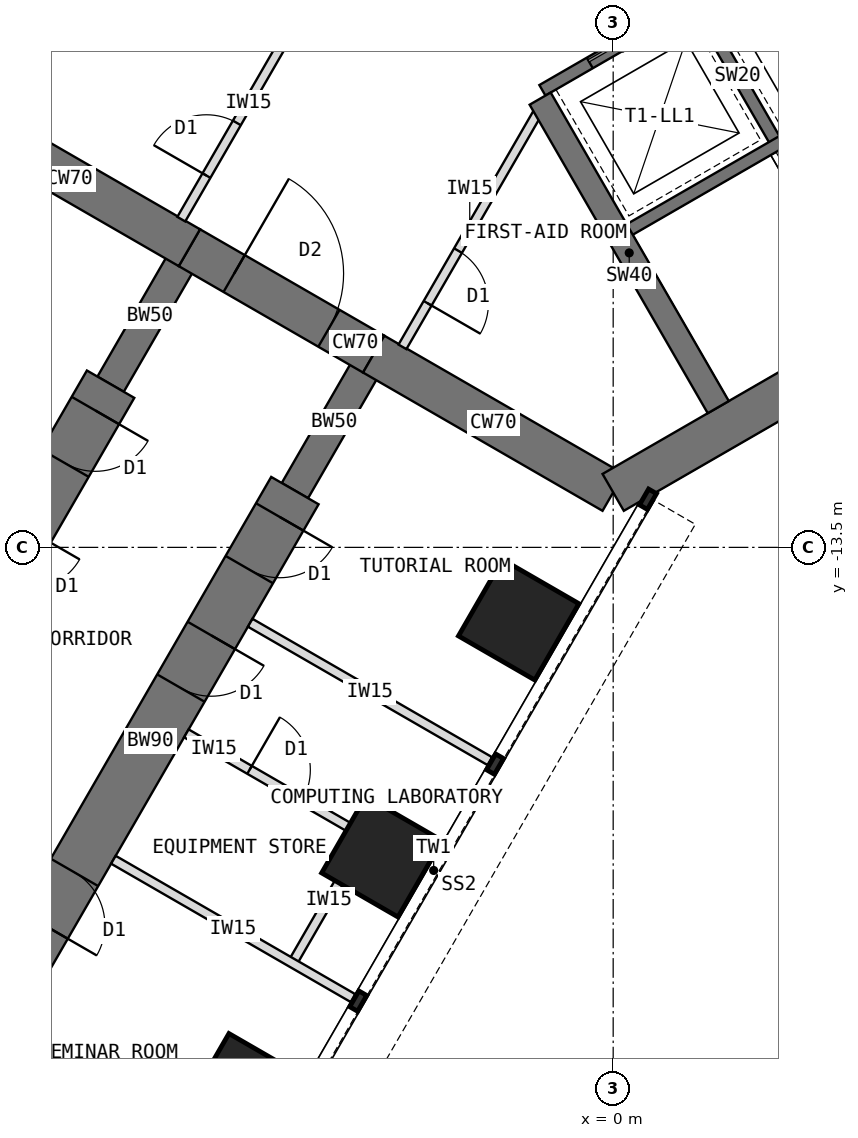
"""IFC4 building model, lengths in metres.
Left out: names, types, materials, properties, quantities, classifications, styles, units other than length and angle.
Written with IfcOpenShell. Run it as: python <this file> out.ifc"""

import sys

from ifc_helpers import new_model, si_unit, direction, frame, frame_2d, origin, origin_2d, place, context, subcontext, project, spatial, rectangle, extrude, element, fill, save


model = new_model("IFC4")
c1 = context("Model", 3, precision=1e-05, world=origin(), true_north=direction((0.0, 1.0)))
c2 = subcontext(c1, "Body", "Model", "MODEL_VIEW")
j1 = project(units=[si_unit("LENGTHUNIT", "METRE"), si_unit("PLANEANGLEUNIT", "RADIAN")], contexts=[c1])
p1 = place(None, origin())
s1 = spatial("IfcSite", under=j1, at=p1, CompositionType="ELEMENT")
p2 = place(p1, origin())
s2 = spatial("IfcBuilding", under=s1, at=p2, CompositionType="ELEMENT")
p3 = place(p2, frame((0.0, 0.0, 60.5)))
s3 = spatial("IfcBuildingStorey", under=s2, at=p3, CompositionType="ELEMENT", Elevation=60.5)
p4 = place(p3, frame((-10.908, -6.298, 0.0), z_axis=(0.0, 0.0, 1.0), x_axis=(0.866034513004, -0.499984222037, 0.0)))
e1 = element("IfcWall", 1, at=p4, inside=s3, PredefinedType="SHEAR", context=c2, shape_type="SweptSolid", body=[
    extrude(rectangle(XDim=4.548, YDim=0.7, at=frame_2d((2.274, 0.0))), origin(), (0.0, 0.0, 1.0), 4.0),
])
p5 = place(p3, frame((-6.97, -8.572, 0.0), z_axis=(0.0, 0.0, 1.0), x_axis=(0.866019471182, -0.500010275428, 0.0)))
e2 = element("IfcWall", 2, at=p5, inside=s3, PredefinedType="SHEAR", context=c2, shape_type="SweptSolid", body=[
    extrude(rectangle(XDim=3.5, YDim=0.7, at=frame_2d((1.75, 0.0))), origin(), (0.0, 0.0, 1.0), 4.0),
])
p6 = place(p5, frame((0.85, 0.0, 0.0)))
e3 = element("IfcOpeningElement", 3, at=p6, cuts=e2, PredefinedType="OPENING", context=c2, shape_type="SweptSolid", body=[
    extrude(rectangle(XDim=1.8, YDim=2.1, at=frame_2d((0.9, 1.05))), frame((0.0, 0.36, 0.0), z_axis=(0.0, -1.0, 0.0), x_axis=(1.0, 0.0, 0.0)), (0.0, 0.0, 1.0), 0.72),
])
p7 = place(p3, frame((-3.939, -10.322, 0.0), z_axis=(0.0, 0.0, 1.0), x_axis=(0.866011268655, -0.500024481964, 0.0)))
e4 = element("IfcWall", 4, at=p7, inside=s3, PredefinedType="SHEAR", context=c2, shape_type="SweptSolid", body=[
    extrude(rectangle(XDim=4.548, YDim=0.7, at=frame_2d((2.274, 0.0))), origin(), (0.0, 0.0, 1.0), 4.0),
])
p8 = place(p3, frame((0.0, -12.596, 0.0), z_axis=(0.0, 0.0, 1.0), x_axis=(0.866021940709, 0.500005998175, 0.0)))
e5 = element("IfcWall", 5, at=p8, inside=s3, PredefinedType="SHEAR", context=c2, shape_type="SweptSolid", body=[
    extrude(rectangle(XDim=12.596, YDim=0.7, at=frame_2d((6.298, 0.0))), origin(), (0.0, 0.0, 1.0), 4.0),
])
p9 = place(p3, frame((-3.939, -10.322, 0.0), z_axis=(0.0, 0.0, 1.0), x_axis=(-0.499918158782, -0.866072649678, 0.0)))
e6 = element("IfcWall", 6, at=p9, inside=s3, PredefinedType="SHEAR", context=c2, shape_type="SweptSolid", body=[
    extrude(rectangle(XDim=2.592, YDim=0.5, at=frame_2d((1.296, 0.0))), origin(), (0.0, 0.0, 1.0), 4.0),
])
p10 = place(p3, frame((-5.234, -12.566, 0.0), z_axis=(0.0, 0.0, 1.0), x_axis=(-0.499997557548, -0.86602681393, 0.0)))
e7 = element("IfcWall", 7, at=p10, inside=s3, PredefinedType="SHEAR", context=c2, shape_type="SweptSolid", body=[
    extrude(rectangle(XDim=9.5, YDim=0.9, at=frame_2d((4.75, 0.0))), origin(), (0.0, 0.0, 1.0), 4.0),
])
p11 = place(p10, frame((0.5, 0.0, 0.0)))
e8 = element("IfcOpeningElement", 8, at=p11, cuts=e7, PredefinedType="OPENING", context=c2, shape_type="SweptSolid", body=[
    extrude(rectangle(XDim=1.0, YDim=2.1, at=frame_2d((0.5, 1.05))), frame((0.0, 0.46, 0.0), z_axis=(0.0, -1.0, 0.0), x_axis=(1.0, 0.0, 0.0)), (0.0, 0.0, 1.0), 0.92),
])
p12 = place(p10, frame((2.75, 0.0, 0.0)))
e9 = element("IfcOpeningElement", 9, at=p12, cuts=e7, PredefinedType="OPENING", context=c2, shape_type="SweptSolid", body=[
    extrude(rectangle(XDim=1.0, YDim=2.1, at=frame_2d((0.5, 1.05))), frame((0.0, 0.46, 0.0), z_axis=(0.0, -1.0, 0.0), x_axis=(1.0, 0.0, 0.0)), (0.0, 0.0, 1.0), 0.92),
])
p13 = place(p10, frame((7.25, 0.0, 0.0)))
e10 = element("IfcOpeningElement", 10, at=p13, cuts=e7, PredefinedType="OPENING", context=c2, shape_type="SweptSolid", body=[
    extrude(rectangle(XDim=1.0, YDim=2.1, at=frame_2d((0.5, 1.05))), frame((0.0, 0.46, 0.0), z_axis=(0.0, -1.0, 0.0), x_axis=(1.0, 0.0, 0.0)), (0.0, 0.0, 1.0), 0.92),
])
p14 = place(p3, frame((-6.97, -8.572, 0.0), z_axis=(0.0, 0.0, 1.0), x_axis=(-0.499988811324, -0.866031863473, 0.0)))
e11 = element("IfcWall", 11, at=p14, inside=s3, PredefinedType="SHEAR", context=c2, shape_type="SweptSolid", body=[
    extrude(rectangle(XDim=2.592, YDim=0.5, at=frame_2d((1.296, 0.0))), origin(), (0.0, 0.0, 1.0), 4.0),
])
p15 = place(p3, frame((-8.266, -10.816, 0.0), z_axis=(0.0, 0.0, 1.0), x_axis=(-0.499997557548, -0.86602681393, 0.0)))
e12 = element("IfcWall", 12, at=p15, inside=s3, PredefinedType="SHEAR", context=c2, shape_type="SweptSolid", body=[
    extrude(rectangle(XDim=9.5, YDim=0.9, at=frame_2d((4.75, 0.0))), origin(), (0.0, 0.0, 1.0), 4.0),
])
p16 = place(p15, frame((0.5, 0.0, 0.0)))
e13 = element("IfcOpeningElement", 13, at=p16, cuts=e12, PredefinedType="OPENING", context=c2, shape_type="SweptSolid", body=[
    extrude(rectangle(XDim=1.0, YDim=2.1, at=frame_2d((0.5, 1.05))), frame((0.0, 0.46, 0.0), z_axis=(0.0, -1.0, 0.0), x_axis=(1.0, 0.0, 0.0)), (0.0, 0.0, 1.0), 0.92),
])
p17 = place(p15, frame((2.75, 0.0, 0.0)))
e14 = element("IfcOpeningElement", 14, at=p17, cuts=e12, PredefinedType="OPENING", context=c2, shape_type="SweptSolid", body=[
    extrude(rectangle(XDim=1.0, YDim=2.1, at=frame_2d((0.5, 1.05))), frame((0.0, 0.46, 0.0), z_axis=(0.0, -1.0, 0.0), x_axis=(1.0, 0.0, 0.0)), (0.0, 0.0, 1.0), 0.92),
])
p18 = place(p15, frame((7.25, 0.0, 0.0)))
e15 = element("IfcOpeningElement", 15, at=p18, cuts=e12, PredefinedType="OPENING", context=c2, shape_type="SweptSolid", body=[
    extrude(rectangle(XDim=1.0, YDim=2.1, at=frame_2d((0.5, 1.05))), frame((0.0, 0.46, 0.0), z_axis=(0.0, -1.0, 0.0), x_axis=(1.0, 0.0, 0.0)), (0.0, 0.0, 1.0), 0.92),
])
for number, where, z_axis, x_axis in (
    (16, (-1.554, -14.691, 0.0), (0.0, 0.0, 1.0), (0.5, 0.866, 0.0)),
    (17, (-3.804, -18.588, 0.0), (0.0, 0.0, 1.0), (0.5, 0.866, 0.0)),
    (18, (-6.054, -22.486, 0.0), (0.0, 0.0, 1.0), (0.5, 0.866, 0.0)),
):
    element("IfcColumn", number, at=place(p3, frame(where, z_axis=z_axis, x_axis=x_axis)), inside=s3, PredefinedType="COLUMN", context=c2, shape_type="SweptSolid", body=[
        extrude(rectangle(XDim=1.45, YDim=1.45, at=origin_2d()), origin(), (0.0, 0.0, 1.0), 4.0),
    ])
p19 = place(p3, frame((-1.164, -5.984, 0.0), z_axis=(0.0, 0.0, 1.0), x_axis=(0.866026010844, 0.49999894854, 0.0)))
e19 = element("IfcWall", 19, at=p19, inside=s3, PredefinedType="SHEAR", context=c2, shape_type="SweptSolid", body=[
    extrude(rectangle(XDim=8.0, YDim=0.2, at=frame_2d((4.0, 0.0))), origin(), (0.0, 0.0, 1.0), 4.0),
])
p20 = place(p19, frame((6.3, 0.0, 0.0)))
e20 = element("IfcOpeningElement", 20, at=p20, cuts=e19, PredefinedType="OPENING", context=c2, shape_type="SweptSolid", body=[
    extrude(rectangle(XDim=1.2, YDim=2.1, at=frame_2d((0.6, 1.05))), frame((0.0, 0.11, 0.0), z_axis=(0.0, -1.0, 0.0), x_axis=(1.0, 0.0, 0.0)), (0.0, 0.0, 1.0), 0.22),
])
p21 = place(p19, frame((0.9, 0.0, 0.0)))
e21 = element("IfcOpeningElement", 21, at=p21, cuts=e19, PredefinedType="OPENING", context=c2, shape_type="SweptSolid", body=[
    extrude(rectangle(XDim=1.1, YDim=2.2, at=frame_2d((0.55, 1.1))), frame((0.0, 0.11, 0.0), z_axis=(0.0, -1.0, 0.0), x_axis=(1.0, 0.0, 0.0)), (0.0, 0.0, 1.0), 0.22),
])
p22 = place(p19, frame((3.8, 0.0, 0.0)))
e22 = element("IfcOpeningElement", 22, at=p22, cuts=e19, PredefinedType="OPENING", context=c2, shape_type="SweptSolid", body=[
    extrude(rectangle(XDim=1.1, YDim=2.2, at=frame_2d((0.55, 1.1))), frame((0.0, 0.11, 0.0), z_axis=(0.0, -1.0, 0.0), x_axis=(1.0, 0.0, 0.0)), (0.0, 0.0, 1.0), 0.22),
])
p23 = place(p3, frame((1.397, -4.62, 0.0), z_axis=(0.0, 0.0, 1.0), x_axis=(0.499936506574, -0.866062058628, 0.0)))
e23 = element("IfcWall", 23, at=p23, inside=s3, PredefinedType="SHEAR", context=c2, shape_type="SweptSolid", body=[
    extrude(rectangle(XDim=2.6, YDim=0.2, at=frame_2d((1.3, 0.0))), origin(), (0.0, 0.0, 1.0), 4.0),
])
p24 = place(p3, frame((0.186, -8.322, 0.0), z_axis=(0.0, 0.0, 1.0), x_axis=(0.866026010844, 0.49999894854, 0.0)))
e24 = element("IfcWall", 24, at=p24, inside=s3, PredefinedType="SHEAR", context=c2, shape_type="SweptSolid", body=[
    extrude(rectangle(XDim=8.0, YDim=0.2, at=frame_2d((4.0, 0.0))), origin(), (0.0, 0.0, 1.0), 4.0),
])
p25 = place(p24, frame((6.7, 0.0, 0.0)))
e25 = element("IfcOpeningElement", 25, at=p25, cuts=e24, PredefinedType="OPENING", context=c2, shape_type="SweptSolid", body=[
    extrude(rectangle(XDim=1.1, YDim=2.1, at=frame_2d((0.55, 1.05))), frame((0.0, 0.11, 0.0), z_axis=(0.0, -1.0, 0.0), x_axis=(1.0, 0.0, 0.0)), (0.0, 0.0, 1.0), 0.22),
])
p26 = place(p3, frame((-1.201, -6.12, 0.0), z_axis=(0.0, 0.0, 1.0), x_axis=(0.500002627198, -0.866023886965, 0.0)))
e26 = element("IfcWall", 26, at=p26, inside=s3, PredefinedType="SHEAR", context=c2, shape_type="SweptSolid", body=[
    extrude(rectangle(XDim=5.858, YDim=0.4, at=frame_2d((2.929, 0.0))), origin(), (0.0, 0.0, 1.0), 4.0),
])
for number, where, z_axis, x_axis in (
    (27, (-5.97, -14.74, 0.0), (0.0, 0.0, 1.0), (0.866, -0.5, 0.0)),
    (28, (-8.22, -18.637, 0.0), (0.0, 0.0, 1.0), (0.866, -0.5, 0.0)),
):
    element("IfcWall", number, at=place(p3, frame(where, z_axis=z_axis, x_axis=x_axis)), inside=s3, PredefinedType="PARTITIONING", context=c2, shape_type="SweptSolid", body=[
        extrude(rectangle(XDim=4.55, YDim=0.15, at=frame_2d((2.275, 0.0))), origin(), (0.0, 0.0, 1.0), 3.8),
    ])
p27 = place(p3, frame((-4.075, -18.259, 0.0), z_axis=(0.0, 0.0, 1.0), x_axis=(-0.500001309137, -0.866024647952, 0.0)))
e29 = element("IfcWall", 29, at=p27, inside=s3, PredefinedType="PARTITIONING", context=c2, shape_type="SweptSolid", body=[
    extrude(rectangle(XDim=2.4, YDim=0.15, at=frame_2d((1.2, 0.0))), origin(), (0.0, 0.0, 1.0), 3.8),
])
p28 = place(p3, frame((-7.02, -16.559, 0.0), z_axis=(0.0, 0.0, 1.0), x_axis=(0.866038511948, -0.499977295307, 0.0)))
e30 = element("IfcWall", 30, at=p28, inside=s3, PredefinedType="PARTITIONING", context=c2, shape_type="SweptSolid", body=[
    extrude(rectangle(XDim=3.4, YDim=0.15, at=frame_2d((1.7, 0.0))), origin(), (0.0, 0.0, 1.0), 3.8),
])
p29 = place(p28, frame((1.2, 0.0, 0.0)))
e31 = element("IfcOpeningElement", 31, at=p29, cuts=e30, PredefinedType="OPENING", context=c2, shape_type="SweptSolid", body=[
    extrude(rectangle(XDim=1.0, YDim=2.1, at=frame_2d((0.5, 1.05))), frame((0.0, 0.085, 0.0), z_axis=(0.0, -1.0, 0.0), x_axis=(1.0, 0.0, 0.0)), (0.0, 0.0, 1.0), 0.17),
])
p30 = place(p3, frame((-1.253, -6.37, 0.0), z_axis=(0.0, 0.0, 1.0), x_axis=(-0.500007369519, -0.866021148949, 0.0)))
e32 = element("IfcWall", 32, at=p30, inside=s3, PredefinedType="PARTITIONING", context=c2, shape_type="SweptSolid", body=[
    extrude(rectangle(XDim=4.426, YDim=0.15, at=frame_2d((2.213, 0.0))), origin(), (0.0, 0.0, 1.0), 3.8),
])
p31 = place(p30, frame((2.598, 0.0, 0.0)))
e33 = element("IfcOpeningElement", 33, at=p31, cuts=e32, PredefinedType="OPENING", context=c2, shape_type="SweptSolid", body=[
    extrude(rectangle(XDim=1.0, YDim=2.1, at=frame_2d((0.5, 1.05))), frame((0.0, 0.085, 0.0), z_axis=(0.0, -1.0, 0.0), x_axis=(1.0, 0.0, 0.0)), (0.0, 0.0, 1.0), 0.17),
])
p32 = place(p3, frame((-7.103, -8.103, 0.0), z_axis=(0.0, 0.0, 1.0), x_axis=(0.500007369519, 0.866021148949, 0.0)))
e34 = element("IfcWall", 34, at=p32, inside=s3, PredefinedType="PARTITIONING", context=c2, shape_type="SweptSolid", body=[
    extrude(rectangle(XDim=4.426, YDim=0.15, at=frame_2d((2.213, 0.0))), origin(), (0.0, 0.0, 1.0), 3.8),
])
p33 = place(p32, frame((0.828, 0.0, 0.0)))
e35 = element("IfcOpeningElement", 35, at=p33, cuts=e34, PredefinedType="OPENING", context=c2, shape_type="SweptSolid", body=[
    extrude(rectangle(XDim=1.0, YDim=2.1, at=frame_2d((0.5, 1.05))), frame((0.0, 0.085, 0.0), z_axis=(0.0, -1.0, 0.0), x_axis=(1.0, 0.0, 0.0)), (0.0, 0.0, 1.0), 0.17),
])
p34 = place(p21, origin())
e36 = element("IfcDoor", 36, at=p34, inside=s3, OperationType="DOUBLE_DOOR_SLIDING", PredefinedType="DOOR", context=c2, shape_type="SweptSolid", body=[
    extrude(rectangle(XDim=1.1, YDim=2.2, at=frame_2d((0.55, 1.1))), frame((0.0, 0.025, 0.0), z_axis=(0.0, -1.0, 0.0), x_axis=(1.0, 0.0, 0.0)), (0.0, 0.0, 1.0), 0.05),
])
fill(e21, e36)
p35 = place(p6, origin())
e37 = element("IfcDoor", 37, at=p35, inside=s3, OperationType="DOUBLE_DOOR_DOUBLE_SWING", PredefinedType="DOOR", context=c2, shape_type="SweptSolid", body=[
    extrude(rectangle(XDim=1.72, YDim=2.06, at=frame_2d((0.9, 1.03))), frame((0.0, 0.025, 0.0), z_axis=(0.0, -1.0, 0.0), x_axis=(1.0, 0.0, 0.0)), (0.0, 0.0, 1.0), 0.05),
    extrude(rectangle(XDim=0.04, YDim=2.1, at=frame_2d((0.02, 1.05))), frame((0.0, 0.35, 0.0), z_axis=(0.0, -1.0, 0.0), x_axis=(1.0, 0.0, 0.0)), (0.0, 0.0, 1.0), 0.699),
    extrude(rectangle(XDim=0.04, YDim=2.1, at=frame_2d((1.78, 1.05))), frame((0.0, 0.35, 0.0), z_axis=(0.0, -1.0, 0.0), x_axis=(1.0, 0.0, 0.0)), (0.0, 0.0, 1.0), 0.699),
    extrude(rectangle(XDim=1.72, YDim=0.04, at=frame_2d((0.9, 2.08))), frame((0.0, 0.35, 0.0), z_axis=(0.0, -1.0, 0.0), x_axis=(1.0, 0.0, 0.0)), (0.0, 0.0, 1.0), 0.699),
])
fill(e3, e37)
p36 = place(p29, origin())
e38 = element("IfcDoor", 38, at=p36, inside=s3, OperationType="SINGLE_SWING_LEFT", PredefinedType="DOOR", context=c2, shape_type="SweptSolid", body=[
    extrude(rectangle(XDim=1.0, YDim=2.1, at=frame_2d((0.5, 1.05))), frame((0.0, 0.025, 0.0), z_axis=(0.0, -1.0, 0.0), x_axis=(1.0, 0.0, 0.0)), (0.0, 0.0, 1.0), 0.05),
])
fill(e31, e38)
p37 = place(p33, origin())
e39 = element("IfcDoor", 39, at=p37, inside=s3, OperationType="SINGLE_SWING_LEFT", PredefinedType="DOOR", context=c2, shape_type="SweptSolid", body=[
    extrude(rectangle(XDim=1.0, YDim=2.1, at=frame_2d((0.5, 1.05))), frame((0.0, 0.025, 0.0), z_axis=(0.0, -1.0, 0.0), x_axis=(1.0, 0.0, 0.0)), (0.0, 0.0, 1.0), 0.05),
])
fill(e35, e39)
p38 = place(p31, origin())
e40 = element("IfcDoor", 40, at=p38, inside=s3, OperationType="SINGLE_SWING_RIGHT", PredefinedType="DOOR", context=c2, shape_type="SweptSolid", body=[
    extrude(rectangle(XDim=1.0, YDim=2.1, at=frame_2d((0.5, 1.05))), frame((0.0, 0.025, 0.0), z_axis=(0.0, -1.0, 0.0), x_axis=(1.0, 0.0, 0.0)), (0.0, 0.0, 1.0), 0.05),
])
fill(e33, e40)
p39 = place(p11, origin())
e41 = element("IfcDoor", 41, at=p39, inside=s3, OperationType="SINGLE_SWING_LEFT", PredefinedType="DOOR", context=c2, shape_type="SweptSolid", body=[
    extrude(rectangle(XDim=0.92, YDim=2.06, at=frame_2d((0.5, 1.03))), frame((0.0, 0.025, 0.0), z_axis=(0.0, -1.0, 0.0), x_axis=(1.0, 0.0, 0.0)), (0.0, 0.0, 1.0), 0.05),
    extrude(rectangle(XDim=0.04, YDim=2.1, at=frame_2d((0.02, 1.05))), frame((0.0, 0.45, 0.0), z_axis=(0.0, -1.0, 0.0), x_axis=(1.0, 0.0, 0.0)), (0.0, 0.0, 1.0), 0.899),
    extrude(rectangle(XDim=0.04, YDim=2.1, at=frame_2d((0.98, 1.05))), frame((0.0, 0.45, 0.0), z_axis=(0.0, -1.0, 0.0), x_axis=(1.0, 0.0, 0.0)), (0.0, 0.0, 1.0), 0.899),
    extrude(rectangle(XDim=0.92, YDim=0.04, at=frame_2d((0.5, 2.08))), frame((0.0, 0.45, 0.0), z_axis=(0.0, -1.0, 0.0), x_axis=(1.0, 0.0, 0.0)), (0.0, 0.0, 1.0), 0.899),
])
fill(e8, e41)
p40 = place(p12, origin())
e42 = element("IfcDoor", 42, at=p40, inside=s3, OperationType="SINGLE_SWING_LEFT", PredefinedType="DOOR", context=c2, shape_type="SweptSolid", body=[
    extrude(rectangle(XDim=0.92, YDim=2.06, at=frame_2d((0.5, 1.03))), frame((0.0, 0.025, 0.0), z_axis=(0.0, -1.0, 0.0), x_axis=(1.0, 0.0, 0.0)), (0.0, 0.0, 1.0), 0.05),
    extrude(rectangle(XDim=0.04, YDim=2.1, at=frame_2d((0.02, 1.05))), frame((0.0, 0.45, 0.0), z_axis=(0.0, -1.0, 0.0), x_axis=(1.0, 0.0, 0.0)), (0.0, 0.0, 1.0), 0.899),
    extrude(rectangle(XDim=0.04, YDim=2.1, at=frame_2d((0.98, 1.05))), frame((0.0, 0.45, 0.0), z_axis=(0.0, -1.0, 0.0), x_axis=(1.0, 0.0, 0.0)), (0.0, 0.0, 1.0), 0.899),
    extrude(rectangle(XDim=0.92, YDim=0.04, at=frame_2d((0.5, 2.08))), frame((0.0, 0.45, 0.0), z_axis=(0.0, -1.0, 0.0), x_axis=(1.0, 0.0, 0.0)), (0.0, 0.0, 1.0), 0.899),
])
fill(e9, e42)
p41 = place(p13, origin())
e43 = element("IfcDoor", 43, at=p41, inside=s3, OperationType="SINGLE_SWING_RIGHT", PredefinedType="DOOR", context=c2, shape_type="SweptSolid", body=[
    extrude(rectangle(XDim=0.92, YDim=2.06, at=frame_2d((0.5, 1.03))), frame((0.0, 0.025, 0.0), z_axis=(0.0, -1.0, 0.0), x_axis=(1.0, 0.0, 0.0)), (0.0, 0.0, 1.0), 0.05),
    extrude(rectangle(XDim=0.04, YDim=2.1, at=frame_2d((0.02, 1.05))), frame((0.0, 0.45, 0.0), z_axis=(0.0, -1.0, 0.0), x_axis=(1.0, 0.0, 0.0)), (0.0, 0.0, 1.0), 0.899),
    extrude(rectangle(XDim=0.04, YDim=2.1, at=frame_2d((0.98, 1.05))), frame((0.0, 0.45, 0.0), z_axis=(0.0, -1.0, 0.0), x_axis=(1.0, 0.0, 0.0)), (0.0, 0.0, 1.0), 0.899),
    extrude(rectangle(XDim=0.92, YDim=0.04, at=frame_2d((0.5, 2.08))), frame((0.0, 0.45, 0.0), z_axis=(0.0, -1.0, 0.0), x_axis=(1.0, 0.0, 0.0)), (0.0, 0.0, 1.0), 0.899),
])
fill(e10, e43)
p42 = place(p16, origin())
e44 = element("IfcDoor", 44, at=p42, inside=s3, OperationType="SINGLE_SWING_LEFT", PredefinedType="DOOR", context=c2, shape_type="SweptSolid", body=[
    extrude(rectangle(XDim=0.92, YDim=2.06, at=frame_2d((0.5, 1.03))), frame((0.0, 0.025, 0.0), z_axis=(0.0, -1.0, 0.0), x_axis=(1.0, 0.0, 0.0)), (0.0, 0.0, 1.0), 0.05),
    extrude(rectangle(XDim=0.04, YDim=2.1, at=frame_2d((0.02, 1.05))), frame((0.0, 0.45, 0.0), z_axis=(0.0, -1.0, 0.0), x_axis=(1.0, 0.0, 0.0)), (0.0, 0.0, 1.0), 0.899),
    extrude(rectangle(XDim=0.04, YDim=2.1, at=frame_2d((0.98, 1.05))), frame((0.0, 0.45, 0.0), z_axis=(0.0, -1.0, 0.0), x_axis=(1.0, 0.0, 0.0)), (0.0, 0.0, 1.0), 0.899),
    extrude(rectangle(XDim=0.92, YDim=0.04, at=frame_2d((0.5, 2.08))), frame((0.0, 0.45, 0.0), z_axis=(0.0, -1.0, 0.0), x_axis=(1.0, 0.0, 0.0)), (0.0, 0.0, 1.0), 0.899),
])
fill(e13, e44)
save(model, sys.argv[1])
